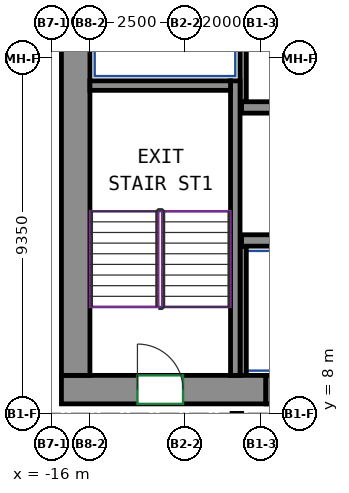
"""IFC4 building model, lengths in metres.
Left out: names, types, materials, properties, quantities, classifications, styles, units other than length and angle.
Written with IfcOpenShell. Run it as: python <this file> out.ifc"""

import sys

from ifc_helpers import new_model, si_unit, direction, frame, frame_2d, origin, place, context, subcontext, project, spatial, rectangle, extrude, source, transform, mapped, element, fill, save


model = new_model("IFC4")
c1 = context("Model", 3, precision=1e-05, world=origin(), true_north=direction((0.0, 1.0)))
c2 = subcontext(c1, "Body", "Model", "MODEL_VIEW")
j1 = project(units=[si_unit("LENGTHUNIT", "METRE"), si_unit("PLANEANGLEUNIT", "RADIAN")], contexts=[c1])
p1 = place(None, origin())
s1 = spatial("IfcSite", under=j1, at=p1, CompositionType="ELEMENT")
p2 = place(p1, origin())
s2 = spatial("IfcBuilding", under=s1, at=p2, CompositionType="ELEMENT")
p3 = place(p2, frame((0.0, 0.0, 188.9)))
s3 = spatial("IfcBuildingStorey", under=s2, at=p3, CompositionType="ELEMENT", Elevation=188.9)
m1 = source(origin(), c2, "Body", "SweptSolid", [
    extrude(rectangle(XDim=5.38, YDim=0.75, at=frame_2d((2.69, 0.0))), origin(), (0.0, 0.0, 1.0), 3.12),
])
p4 = place(p3, frame((-15.75, 8.625, 0.0), z_axis=(0.0, 0.0, 1.0), x_axis=(1.0, 0.0, 0.0)))
e1 = element("IfcWall", 1, at=p4, inside=s3, PredefinedType="SHEAR", context=c2, shape_type="MappedRepresentation", body=[
    mapped(m1, transform((0.0, 0.0, 0.0))),
])
p5 = place(p4, frame((2.0, 0.0, 0.0)))
e2 = element("IfcOpeningElement", 2, at=p5, cuts=e1, PredefinedType="OPENING", context=c2, shape_type="SweptSolid", body=[
    extrude(rectangle(XDim=1.2, YDim=2.1, at=frame_2d((0.6, 1.05))), frame((0.0, 0.385, 0.0), z_axis=(0.0, -1.0, 0.0), x_axis=(1.0, 0.0, 0.0)), (0.0, 0.0, 1.0), 0.77),
])
m2 = source(origin(), c2, "Body", "SweptSolid", [
    extrude(rectangle(XDim=12.0, YDim=0.75, at=frame_2d((6.0, 0.0))), origin(), (0.0, 0.0, 1.0), 3.12),
])
p6 = place(p3, frame((-15.375, 9.0, 0.0), z_axis=(0.0, 0.0, 1.0), x_axis=(0.0, 1.0, 0.0)))
e3 = element("IfcWall", 3, at=p6, inside=s3, PredefinedType="SHEAR", context=c2, shape_type="MappedRepresentation", body=[
    mapped(m2, transform((0.0, 0.0, 0.0))),
])
m3 = source(origin(), c2, "Body", "SweptSolid", [
    extrude(rectangle(XDim=7.75, YDim=0.25, at=frame_2d((3.875, 0.0))), origin(), (0.0, 0.0, 1.0), 3.12),
])
p7 = place(p3, frame((-11.175, 9.0, 0.0), z_axis=(0.0, 0.0, 1.0), x_axis=(0.0, 1.0, 0.0)))
e4 = element("IfcWall", 4, at=p7, inside=s3, PredefinedType="SHEAR", context=c2, shape_type="MappedRepresentation", body=[
    mapped(m3, transform((0.0, 0.0, 0.0))),
])
m4 = source(origin(), c2, "Body", "SweptSolid", [
    extrude(rectangle(XDim=3.7, YDim=0.25, at=frame_2d((1.85, 0.0))), origin(), (0.0, 0.0, 1.0), 3.12),
])
p8 = place(p3, frame((-15.0, 16.625, 0.0), z_axis=(0.0, 0.0, 1.0), x_axis=(1.0, 0.0, 0.0)))
e5 = element("IfcWall", 5, at=p8, inside=s3, PredefinedType="SHEAR", context=c2, shape_type="MappedRepresentation", body=[
    mapped(m4, transform((0.0, 0.0, 0.0))),
])
m5 = source(origin(), c2, "Body", "SweptSolid", [
    extrude(rectangle(XDim=6.0, YDim=0.3, at=frame_2d((3.0, 0.0))), origin(), (0.0, 0.0, 1.0), 3.12),
])
p9 = place(p3, frame((-11.01, 12.55, 0.0), z_axis=(0.0, 0.0, 1.0), x_axis=(1.0, 0.0, 0.0)))
e6 = element("IfcWall", 6, at=p9, inside=s3, PredefinedType="SHEAR", context=c2, shape_type="MappedRepresentation", body=[
    mapped(m5, transform((0.0, 0.0, 0.0))),
])
m6 = source(origin(), c2, "Body", "SweptSolid", [
    extrude(rectangle(XDim=14.04, YDim=0.3, at=frame_2d((7.02, 0.0))), origin(), (0.0, 0.0, 1.0), 3.12),
])
p10 = place(p3, frame((-11.01, 16.05, 0.0), z_axis=(0.0, 0.0, 1.0), x_axis=(1.0, 0.0, 0.0)))
e7 = element("IfcWall", 7, at=p10, inside=s3, PredefinedType="SHEAR", context=c2, shape_type="MappedRepresentation", body=[
    mapped(m6, transform((0.0, 0.0, 0.0))),
])
m7 = source(origin(), c2, "Body", "SweptSolid", [
    extrude(rectangle(XDim=4.8, YDim=0.165, at=frame_2d((2.4, 0.0))), origin(), (0.0, 0.0, 1.0), 3.12),
])
p11 = place(p3, frame((-10.968, 16.2, 0.0), z_axis=(0.0, 0.0, 1.0), x_axis=(0.0, 1.0, 0.0)))
e8 = element("IfcWall", 8, at=p11, inside=s3, PredefinedType="PARTITIONING", context=c2, shape_type="MappedRepresentation", body=[
    mapped(m7, transform((0.0, 0.0, 0.0))),
])
m8 = source(origin(), c2, "Body", "SweptSolid", [
    extrude(rectangle(XDim=3.4, YDim=0.165, at=frame_2d((1.7, 0.0))), origin(), (0.0, 0.0, 1.0), 3.12),
])
p12 = place(p3, frame((-10.968, 9.0, 0.0), z_axis=(0.0, 0.0, 1.0), x_axis=(0.0, 1.0, 0.0)))
e9 = element("IfcWall", 9, at=p12, inside=s3, PredefinedType="PARTITIONING", context=c2, shape_type="MappedRepresentation", body=[
    mapped(m8, transform((0.0, 0.0, 0.0))),
])
m9 = source(origin(), c2, "Body", "SweptSolid", [
    extrude(rectangle(XDim=1.4, YDim=0.75, at=frame_2d((0.7, 0.0))), origin(), (0.0, 0.0, 1.0), 2.7),
])
p13 = place(p3, frame((-10.37, 8.625, 0.0), z_axis=(0.0, 0.0, 1.0), x_axis=(1.0, 0.0, 0.0)))
e10 = element("IfcWall", 10, at=p13, inside=s3, PredefinedType="PARTITIONING", context=c2, shape_type="MappedRepresentation", body=[
    mapped(m9, transform((0.0, 0.0, 0.0))),
])
p14 = place(p13, frame((0.25, 0.0, 0.0)))
e11 = element("IfcOpeningElement", 11, at=p14, cuts=e10, PredefinedType="OPENING", context=c2, shape_type="SweptSolid", body=[
    extrude(rectangle(XDim=0.9, YDim=2.1, at=frame_2d((0.45, 1.05))), frame((0.0, 0.385, 0.0), z_axis=(0.0, -1.0, 0.0), x_axis=(1.0, 0.0, 0.0)), (0.0, 0.0, 1.0), 0.77),
])
p15 = place(p5, origin())
e12 = element("IfcDoor", 12, at=p15, inside=s3, OperationType="DOUBLE_DOOR_SINGLE_SWING", PredefinedType="DOOR", context=c2, shape_type="SweptSolid", body=[
    extrude(rectangle(XDim=1.2, YDim=2.1, at=frame_2d((0.6, 1.05))), frame((0.0, 0.28, 0.0), z_axis=(0.0, -1.0, 0.0), x_axis=(1.0, 0.0, 0.0)), (0.0, 0.0, 1.0), 0.05),
])
fill(e2, e12)
save(model, sys.argv[1])
